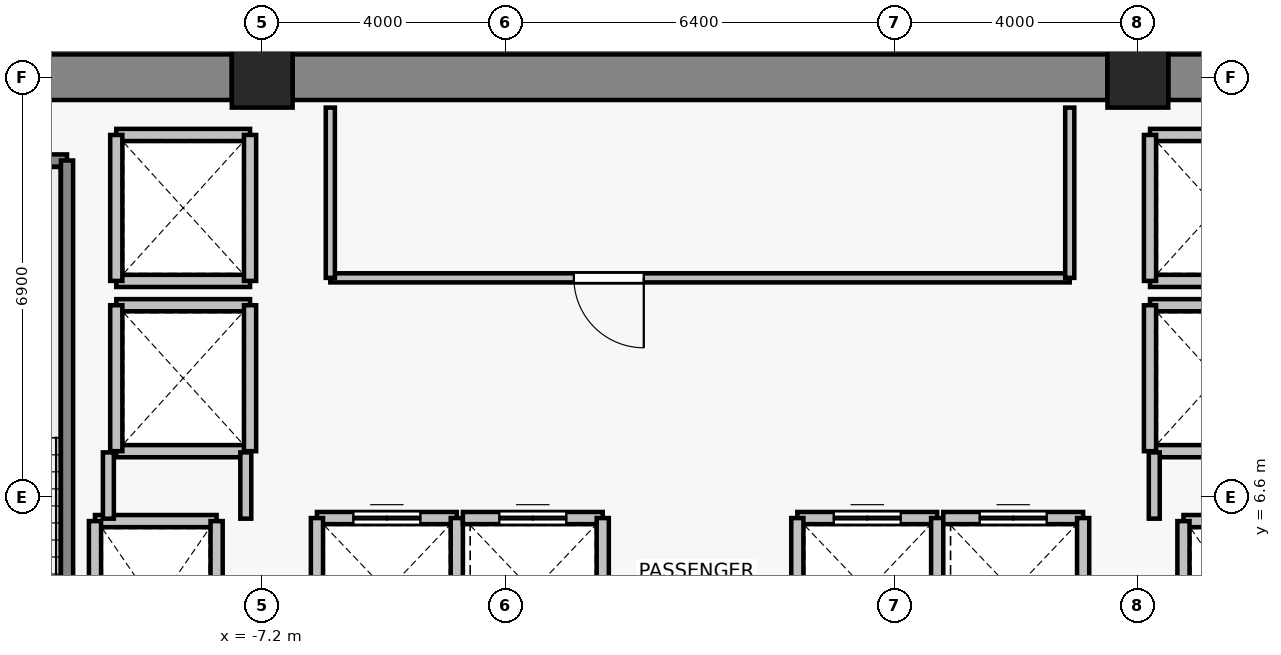
"""IFC4 building model, lengths in metres.
Left out: names, types, materials, properties, quantities, classifications, styles, units other than length and angle.
Written with IfcOpenShell. Run it as: python <this file> out.ifc"""

import sys

from ifc_helpers import new_model, si_unit, direction, frame, frame_2d, origin, origin_2d, place, context, subcontext, project, spatial, rectangle, extrude, source, transform, mapped, element, fill, save


model = new_model("IFC4")
c1 = context("Model", 3, precision=1e-05, world=origin(), true_north=direction((0.0, 1.0)))
c2 = subcontext(c1, "Body", "Model", "MODEL_VIEW")
j1 = project(units=[si_unit("LENGTHUNIT", "METRE"), si_unit("PLANEANGLEUNIT", "RADIAN")], contexts=[c1])
p1 = place(None, origin())
s1 = spatial("IfcSite", under=j1, at=p1, CompositionType="ELEMENT")
p2 = place(p1, origin())
s2 = spatial("IfcBuilding", under=s1, at=p2, CompositionType="ELEMENT")
p3 = place(p2, frame((0.0, 0.0, 129.7)))
s3 = spatial("IfcBuildingStorey", under=s2, at=p3, CompositionType="ELEMENT", Elevation=129.7)
for number, where, z_axis, x_axis in (
    (1, (-7.2, 13.5, 0.0), (0.0, 0.0, 1.0), (1.0, 0.0, 0.0)),
    (2, (7.2, 13.5, 0.0), (0.0, 0.0, 1.0), (1.0, 0.0, 0.0)),
):
    element("IfcColumn", number, at=place(p3, frame(where, z_axis=z_axis, x_axis=x_axis)), inside=s3, PredefinedType="COLUMN", context=c2, shape_type="SweptSolid", body=[
        extrude(rectangle(XDim=1.0, YDim=1.0, at=origin_2d()), origin(), (0.0, 0.0, 1.0), 3.3),
    ])
p4 = place(p3, frame((-13.9, 13.5, 0.0), z_axis=(0.0, 0.0, 1.0), x_axis=(1.0, 0.0, 0.0)))
e3 = element("IfcWall", 3, at=p4, inside=s3, PredefinedType="SHEAR", context=c2, shape_type="SweptSolid", body=[
    extrude(rectangle(XDim=6.2, YDim=0.75, at=frame_2d((3.1, 0.0))), origin(), (0.0, 0.0, 1.0), 3.075),
])
p5 = place(p3, frame((-6.7, 13.5, 0.0), z_axis=(0.0, 0.0, 1.0), x_axis=(1.0, 0.0, 0.0)))
e4 = element("IfcWall", 4, at=p5, inside=s3, PredefinedType="SHEAR", context=c2, shape_type="SweptSolid", body=[
    extrude(rectangle(XDim=13.4, YDim=0.75, at=frame_2d((6.7, 0.0))), origin(), (0.0, 0.0, 1.0), 3.075),
])
p6 = place(p3, frame((7.7, 13.5, 0.0), z_axis=(0.0, 0.0, 1.0), x_axis=(1.0, 0.0, 0.0)))
e5 = element("IfcWall", 5, at=p6, inside=s3, PredefinedType="SHEAR", context=c2, shape_type="SweptSolid", body=[
    extrude(rectangle(XDim=6.2, YDim=0.75, at=frame_2d((3.1, 0.0))), origin(), (0.0, 0.0, 1.0), 3.075),
])
p7 = place(p3, frame((-9.95, 6.2, 0.0), z_axis=(0.0, 0.0, 1.0), x_axis=(1.0, 0.0, 0.0)))
e6 = element("IfcWall", 6, at=p7, inside=s3, PredefinedType="SOLIDWALL", context=c2, shape_type="SweptSolid", body=[
    extrude(rectangle(XDim=2.0, YDim=0.2, at=frame_2d((1.0, 0.0))), origin(), (0.0, 0.0, 1.0), 3.075),
])
for number, where, z_axis, x_axis in (
    (7, (-9.95, 3.4, 0.0), (0.0, 0.0, 1.0), (0.0, 1.0, 0.0)),
    (8, (-7.95, 6.2, 0.0), (0.0, 0.0, 1.0), (0.0, -1.0, 0.0)),
):
    element("IfcWall", number, at=place(p3, frame(where, z_axis=z_axis, x_axis=x_axis)), inside=s3, PredefinedType="SOLIDWALL", context=c2, shape_type="SweptSolid", body=[
        extrude(rectangle(XDim=2.8, YDim=0.2, at=frame_2d((1.4, 0.0))), origin(), (0.0, 0.0, 1.0), 3.075),
    ])
p8 = place(p3, frame((7.95, 6.2, 0.0), z_axis=(0.0, 0.0, 1.0), x_axis=(1.0, 0.0, 0.0)))
e9 = element("IfcWall", 9, at=p8, inside=s3, PredefinedType="SOLIDWALL", context=c2, shape_type="SweptSolid", body=[
    extrude(rectangle(XDim=2.0, YDim=0.2, at=frame_2d((1.0, 0.0))), origin(), (0.0, 0.0, 1.0), 3.075),
])
p9 = place(p3, frame((7.95, 3.4, 0.0), z_axis=(0.0, 0.0, 1.0), x_axis=(0.0, 1.0, 0.0)))
e10 = element("IfcWall", 10, at=p9, inside=s3, PredefinedType="SOLIDWALL", context=c2, shape_type="SweptSolid", body=[
    extrude(rectangle(XDim=2.8, YDim=0.2, at=frame_2d((1.4, 0.0))), origin(), (0.0, 0.0, 1.0), 3.075),
])
p10 = place(p3, frame((-6.3, 6.25, 0.0), z_axis=(0.0, 0.0, 1.0), x_axis=(1.0, 0.0, 0.0)))
e11 = element("IfcWall", 11, at=p10, inside=s3, PredefinedType="SOLIDWALL", context=c2, shape_type="SweptSolid", body=[
    extrude(rectangle(XDim=2.3, YDim=0.2, at=frame_2d((1.15, 0.0))), origin(), (0.0, 0.0, 1.0), 3.075),
])
p11 = place(p10, frame((0.6, 0.0, 0.0)))
e12 = element("IfcOpeningElement", 12, at=p11, cuts=e11, PredefinedType="OPENING", context=c2, shape_type="SweptSolid", body=[
    extrude(rectangle(XDim=1.1, YDim=2.2, at=frame_2d((0.55, 1.1))), frame((0.0, 0.11, 0.0), z_axis=(0.0, -1.0, 0.0), x_axis=(1.0, 0.0, 0.0)), (0.0, 0.0, 1.0), 0.22),
])
for number, where, z_axis, x_axis in (
    (13, (-6.3, 3.85, 0.0), (0.0, 0.0, 1.0), (0.0, 1.0, 0.0)),
    (14, (-4.0, 6.25, 0.0), (0.0, 0.0, 1.0), (0.0, -1.0, 0.0)),
):
    element("IfcWall", number, at=place(p3, frame(where, z_axis=z_axis, x_axis=x_axis)), inside=s3, PredefinedType="SOLIDWALL", context=c2, shape_type="SweptSolid", body=[
        extrude(rectangle(XDim=2.4, YDim=0.2, at=frame_2d((1.2, 0.0))), origin(), (0.0, 0.0, 1.0), 3.075),
    ])
p12 = place(p3, frame((-3.9, 6.25, 0.0), z_axis=(0.0, 0.0, 1.0), x_axis=(1.0, 0.0, 0.0)))
e15 = element("IfcWall", 15, at=p12, inside=s3, PredefinedType="SOLIDWALL", context=c2, shape_type="SweptSolid", body=[
    extrude(rectangle(XDim=2.3, YDim=0.2, at=frame_2d((1.15, 0.0))), origin(), (0.0, 0.0, 1.0), 3.075),
])
p13 = place(p12, frame((0.6, 0.0, 0.0)))
e16 = element("IfcOpeningElement", 16, at=p13, cuts=e15, PredefinedType="OPENING", context=c2, shape_type="SweptSolid", body=[
    extrude(rectangle(XDim=1.1, YDim=2.2, at=frame_2d((0.55, 1.1))), frame((0.0, 0.11, 0.0), z_axis=(0.0, -1.0, 0.0), x_axis=(1.0, 0.0, 0.0)), (0.0, 0.0, 1.0), 0.22),
])
p14 = place(p3, frame((-1.6, 6.25, 0.0), z_axis=(0.0, 0.0, 1.0), x_axis=(0.0, -1.0, 0.0)))
e17 = element("IfcWall", 17, at=p14, inside=s3, PredefinedType="SOLIDWALL", context=c2, shape_type="SweptSolid", body=[
    extrude(rectangle(XDim=2.4, YDim=0.2, at=frame_2d((1.2, 0.0))), origin(), (0.0, 0.0, 1.0), 3.075),
])
p15 = place(p3, frame((1.6, 6.25, 0.0), z_axis=(0.0, 0.0, 1.0), x_axis=(1.0, 0.0, 0.0)))
e18 = element("IfcWall", 18, at=p15, inside=s3, PredefinedType="SOLIDWALL", context=c2, shape_type="SweptSolid", body=[
    extrude(rectangle(XDim=2.3, YDim=0.2, at=frame_2d((1.15, 0.0))), origin(), (0.0, 0.0, 1.0), 3.075),
])
p16 = place(p15, frame((0.6, 0.0, 0.0)))
e19 = element("IfcOpeningElement", 19, at=p16, cuts=e18, PredefinedType="OPENING", context=c2, shape_type="SweptSolid", body=[
    extrude(rectangle(XDim=1.1, YDim=2.2, at=frame_2d((0.55, 1.1))), frame((0.0, 0.11, 0.0), z_axis=(0.0, -1.0, 0.0), x_axis=(1.0, 0.0, 0.0)), (0.0, 0.0, 1.0), 0.22),
])
for number, where, z_axis, x_axis in (
    (20, (1.6, 3.85, 0.0), (0.0, 0.0, 1.0), (0.0, 1.0, 0.0)),
    (21, (3.9, 6.25, 0.0), (0.0, 0.0, 1.0), (0.0, -1.0, 0.0)),
):
    element("IfcWall", number, at=place(p3, frame(where, z_axis=z_axis, x_axis=x_axis)), inside=s3, PredefinedType="SOLIDWALL", context=c2, shape_type="SweptSolid", body=[
        extrude(rectangle(XDim=2.4, YDim=0.2, at=frame_2d((1.2, 0.0))), origin(), (0.0, 0.0, 1.0), 3.075),
    ])
p17 = place(p3, frame((4.0, 6.25, 0.0), z_axis=(0.0, 0.0, 1.0), x_axis=(1.0, 0.0, 0.0)))
e22 = element("IfcWall", 22, at=p17, inside=s3, PredefinedType="SOLIDWALL", context=c2, shape_type="SweptSolid", body=[
    extrude(rectangle(XDim=2.3, YDim=0.2, at=frame_2d((1.15, 0.0))), origin(), (0.0, 0.0, 1.0), 3.075),
])
p18 = place(p17, frame((0.6, 0.0, 0.0)))
e23 = element("IfcOpeningElement", 23, at=p18, cuts=e22, PredefinedType="OPENING", context=c2, shape_type="SweptSolid", body=[
    extrude(rectangle(XDim=1.1, YDim=2.2, at=frame_2d((0.55, 1.1))), frame((0.0, 0.11, 0.0), z_axis=(0.0, -1.0, 0.0), x_axis=(1.0, 0.0, 0.0)), (0.0, 0.0, 1.0), 0.22),
])
p19 = place(p3, frame((6.3, 6.25, 0.0), z_axis=(0.0, 0.0, 1.0), x_axis=(0.0, -1.0, 0.0)))
e24 = element("IfcWall", 24, at=p19, inside=s3, PredefinedType="SOLIDWALL", context=c2, shape_type="SweptSolid", body=[
    extrude(rectangle(XDim=2.4, YDim=0.2, at=frame_2d((1.2, 0.0))), origin(), (0.0, 0.0, 1.0), 3.075),
])
for number, where, z_axis, x_axis in (
    (25, (-7.4, 7.35, 0.0), (0.0, 0.0, 1.0), (-1.0, 0.0, 0.0)),
    (26, (-9.6, 9.75, 0.0), (0.0, 0.0, 1.0), (1.0, 0.0, 0.0)),
):
    element("IfcWall", number, at=place(p3, frame(where, z_axis=z_axis, x_axis=x_axis)), inside=s3, PredefinedType="SOLIDWALL", context=c2, shape_type="SweptSolid", body=[
        extrude(rectangle(XDim=2.2, YDim=0.2, at=frame_2d((1.1, 0.0))), origin(), (0.0, 0.0, 1.0), 2.515),
    ])
p20 = place(p3, frame((-9.6, 7.35, 0.0), z_axis=(0.0, 0.0, 1.0), x_axis=(0.0, 1.0, 0.0)))
e27 = element("IfcWall", 27, at=p20, inside=s3, PredefinedType="SOLIDWALL", context=c2, shape_type="SweptSolid", body=[
    extrude(rectangle(XDim=2.4, YDim=0.2, at=frame_2d((1.2, 0.0))), origin(), (0.0, 0.0, 1.0), 3.075),
])
p21 = place(p3, frame((-7.4, 9.75, 0.0), z_axis=(0.0, 0.0, 1.0), x_axis=(0.0, -1.0, 0.0)))
e28 = element("IfcWall", 28, at=p21, inside=s3, PredefinedType="SOLIDWALL", context=c2, shape_type="SweptSolid", body=[
    extrude(rectangle(XDim=2.4, YDim=0.2, at=frame_2d((1.2, 0.0))), origin(), (0.0, 0.0, 1.0), 2.515),
])
for number, where, z_axis, x_axis in (
    (29, (-7.4, 10.15, 0.0), (0.0, 0.0, 1.0), (-1.0, 0.0, 0.0)),
    (30, (-9.6, 12.55, 0.0), (0.0, 0.0, 1.0), (1.0, 0.0, 0.0)),
):
    element("IfcWall", number, at=place(p3, frame(where, z_axis=z_axis, x_axis=x_axis)), inside=s3, PredefinedType="SOLIDWALL", context=c2, shape_type="SweptSolid", body=[
        extrude(rectangle(XDim=2.2, YDim=0.2, at=frame_2d((1.1, 0.0))), origin(), (0.0, 0.0, 1.0), 2.515),
    ])
p22 = place(p3, frame((-9.6, 10.15, 0.0), z_axis=(0.0, 0.0, 1.0), x_axis=(0.0, 1.0, 0.0)))
e31 = element("IfcWall", 31, at=p22, inside=s3, PredefinedType="SOLIDWALL", context=c2, shape_type="SweptSolid", body=[
    extrude(rectangle(XDim=2.4, YDim=0.2, at=frame_2d((1.2, 0.0))), origin(), (0.0, 0.0, 1.0), 3.075),
])
p23 = place(p3, frame((-7.4, 12.55, 0.0), z_axis=(0.0, 0.0, 1.0), x_axis=(0.0, -1.0, 0.0)))
e32 = element("IfcWall", 32, at=p23, inside=s3, PredefinedType="SOLIDWALL", context=c2, shape_type="SweptSolid", body=[
    extrude(rectangle(XDim=2.4, YDim=0.2, at=frame_2d((1.2, 0.0))), origin(), (0.0, 0.0, 1.0), 2.515),
])
for number, where, z_axis, x_axis in (
    (33, (9.6, 7.35, 0.0), (0.0, 0.0, 1.0), (-1.0, 0.0, 0.0)),
    (34, (7.4, 9.75, 0.0), (0.0, 0.0, 1.0), (1.0, 0.0, 0.0)),
):
    element("IfcWall", number, at=place(p3, frame(where, z_axis=z_axis, x_axis=x_axis)), inside=s3, PredefinedType="SOLIDWALL", context=c2, shape_type="SweptSolid", body=[
        extrude(rectangle(XDim=2.2, YDim=0.2, at=frame_2d((1.1, 0.0))), origin(), (0.0, 0.0, 1.0), 2.515),
    ])
p24 = place(p3, frame((7.4, 7.35, 0.0), z_axis=(0.0, 0.0, 1.0), x_axis=(0.0, 1.0, 0.0)))
e35 = element("IfcWall", 35, at=p24, inside=s3, PredefinedType="SOLIDWALL", context=c2, shape_type="SweptSolid", body=[
    extrude(rectangle(XDim=2.4, YDim=0.2, at=frame_2d((1.2, 0.0))), origin(), (0.0, 0.0, 1.0), 2.515),
])
for number, where, z_axis, x_axis in (
    (36, (9.6, 10.15, 0.0), (0.0, 0.0, 1.0), (-1.0, 0.0, 0.0)),
    (37, (7.4, 12.55, 0.0), (0.0, 0.0, 1.0), (1.0, 0.0, 0.0)),
):
    element("IfcWall", number, at=place(p3, frame(where, z_axis=z_axis, x_axis=x_axis)), inside=s3, PredefinedType="SOLIDWALL", context=c2, shape_type="SweptSolid", body=[
        extrude(rectangle(XDim=2.2, YDim=0.2, at=frame_2d((1.1, 0.0))), origin(), (0.0, 0.0, 1.0), 2.515),
    ])
p25 = place(p3, frame((7.4, 10.15, 0.0), z_axis=(0.0, 0.0, 1.0), x_axis=(0.0, 1.0, 0.0)))
e38 = element("IfcWall", 38, at=p25, inside=s3, PredefinedType="SOLIDWALL", context=c2, shape_type="SweptSolid", body=[
    extrude(rectangle(XDim=2.4, YDim=0.2, at=frame_2d((1.2, 0.0))), origin(), (0.0, 0.0, 1.0), 2.515),
])
p26 = place(p3, frame((-13.93, 12.13, 0.0), z_axis=(0.0, 0.0, 1.0), x_axis=(1.0, 0.0, 0.0)))
e39 = element("IfcWall", 39, at=p26, inside=s3, PredefinedType="SOLIDWALL", context=c2, shape_type="SweptSolid", body=[
    extrude(rectangle(XDim=3.52, YDim=0.2, at=frame_2d((1.76, 0.0))), origin(), (0.0, 0.0, 1.0), 3.075),
])
p27 = place(p3, frame((-10.41, 12.13, 0.0), z_axis=(0.0, 0.0, 1.0), x_axis=(0.0, -1.0, 0.0)))
e40 = element("IfcWall", 40, at=p27, inside=s3, PredefinedType="SOLIDWALL", context=c2, shape_type="SweptSolid", body=[
    extrude(rectangle(XDim=8.84, YDim=0.2, at=frame_2d((4.42, 0.0))), origin(), (0.0, 0.0, 1.0), 3.075),
])
p28 = place(p3, frame((-9.73, 6.24, 0.0), z_axis=(0.0, 0.0, 1.0), x_axis=(0.0, 1.0, 0.0)))
e41 = element("IfcWall", 41, at=p28, inside=s3, PredefinedType="PARTITIONING", context=c2, shape_type="SweptSolid", body=[
    extrude(rectangle(XDim=1.09, YDim=0.18, at=frame_2d((0.545, 0.0))), origin(), (0.0, 0.0, 1.0), 3.075),
])
for number, where, z_axis, x_axis in (
    (42, (-7.47, 7.33, 0.0), (0.0, 0.0, 1.0), (0.0, -1.0, 0.0)),
    (43, (7.47, 6.24, 0.0), (0.0, 0.0, 1.0), (0.0, 1.0, 0.0)),
):
    element("IfcWall", number, at=place(p3, frame(where, z_axis=z_axis, x_axis=x_axis)), inside=s3, PredefinedType="PARTITIONING", context=c2, shape_type="SweptSolid", body=[
        extrude(rectangle(XDim=1.09, YDim=0.18, at=frame_2d((0.545, 0.0))), origin(), (0.0, 0.0, 1.0), 2.515),
    ])
p29 = place(p3, frame((6.08, 10.2, 0.0), z_axis=(0.0, 0.0, 1.0), x_axis=(-1.0, 0.0, 0.0)))
e44 = element("IfcWall", 44, at=p29, inside=s3, PredefinedType="PARTITIONING", context=c2, shape_type="SweptSolid", body=[
    extrude(rectangle(XDim=12.16, YDim=0.15, at=frame_2d((6.08, 0.0))), origin(), (0.0, 0.0, 1.0), 3.075),
])
p30 = place(p29, frame((7.005, 0.0, 0.0)))
e45 = element("IfcOpeningElement", 45, at=p30, cuts=e44, PredefinedType="OPENING", context=c2, shape_type="SweptSolid", body=[
    extrude(rectangle(XDim=1.15, YDim=2.15, at=frame_2d((0.575, 1.075))), frame((0.0, 0.085, 0.0), z_axis=(0.0, -1.0, 0.0), x_axis=(1.0, 0.0, 0.0)), (0.0, 0.0, 1.0), 0.17),
])
for number, where, z_axis, x_axis in (
    (46, (-6.08, 10.2, 0.0), (0.0, 0.0, 1.0), (0.0, 1.0, 0.0)),
    (47, (6.08, 13.0, 0.0), (0.0, 0.0, 1.0), (0.0, -1.0, 0.0)),
):
    element("IfcWall", number, at=place(p3, frame(where, z_axis=z_axis, x_axis=x_axis)), inside=s3, PredefinedType="PARTITIONING", context=c2, shape_type="SweptSolid", body=[
        extrude(rectangle(XDim=2.8, YDim=0.15, at=frame_2d((1.4, 0.0))), origin(), (0.0, 0.0, 1.0), 3.075),
    ])
m1 = source(origin(), c2, "Body", "SweptSolid", [
    extrude(rectangle(XDim=1.1, YDim=2.2, at=frame_2d((0.55, 1.1))), frame((0.0, 0.025, 0.0), z_axis=(0.0, -1.0, 0.0), x_axis=(1.0, 0.0, 0.0)), (0.0, 0.0, 1.0), 0.05),
])
p31 = place(p11, origin())
e48 = element("IfcDoor", 48, at=p31, inside=s3, OperationType="DOUBLE_DOOR_SLIDING", PredefinedType="DOOR", context=c2, shape_type="MappedRepresentation", body=[
    mapped(m1, transform((0.0, 0.0, 0.0), x_axis=(1.0, 0.0, 0.0), y_axis=(0.0, 1.0, 0.0), z_axis=(0.0, 0.0, 1.0), scale=1.0)),
])
fill(e12, e48)
p32 = place(p13, origin())
e49 = element("IfcDoor", 49, at=p32, inside=s3, OperationType="DOUBLE_DOOR_SLIDING", PredefinedType="DOOR", context=c2, shape_type="MappedRepresentation", body=[
    mapped(m1, transform((0.0, 0.0, 0.0), x_axis=(1.0, 0.0, 0.0), y_axis=(0.0, 1.0, 0.0), z_axis=(0.0, 0.0, 1.0), scale=1.0)),
])
fill(e16, e49)
p33 = place(p16, origin())
e50 = element("IfcDoor", 50, at=p33, inside=s3, OperationType="DOUBLE_DOOR_SLIDING", PredefinedType="DOOR", context=c2, shape_type="MappedRepresentation", body=[
    mapped(m1, transform((0.0, 0.0, 0.0), x_axis=(1.0, 0.0, 0.0), y_axis=(0.0, 1.0, 0.0), z_axis=(0.0, 0.0, 1.0), scale=1.0)),
])
fill(e19, e50)
p34 = place(p18, origin())
e51 = element("IfcDoor", 51, at=p34, inside=s3, OperationType="DOUBLE_DOOR_SLIDING", PredefinedType="DOOR", context=c2, shape_type="MappedRepresentation", body=[
    mapped(m1, transform((0.0, 0.0, 0.0), x_axis=(1.0, 0.0, 0.0), y_axis=(0.0, 1.0, 0.0), z_axis=(0.0, 0.0, 1.0), scale=1.0)),
])
fill(e23, e51)
m2 = source(origin(), c2, "Body", "SweptSolid", [
    extrude(rectangle(XDim=1.15, YDim=2.15, at=frame_2d((0.575, 1.075))), frame((0.0, 0.025, 0.0), z_axis=(0.0, -1.0, 0.0), x_axis=(1.0, 0.0, 0.0)), (0.0, 0.0, 1.0), 0.05),
])
p35 = place(p30, origin())
e52 = element("IfcDoor", 52, at=p35, inside=s3, OperationType="SINGLE_SWING_LEFT", PredefinedType="DOOR", context=c2, shape_type="MappedRepresentation", body=[
    mapped(m2, transform((0.0, 0.0, 0.0), x_axis=(1.0, 0.0, 0.0), y_axis=(0.0, 1.0, 0.0), z_axis=(0.0, 0.0, 1.0), scale=1.0)),
])
fill(e45, e52)
save(model, sys.argv[1])
